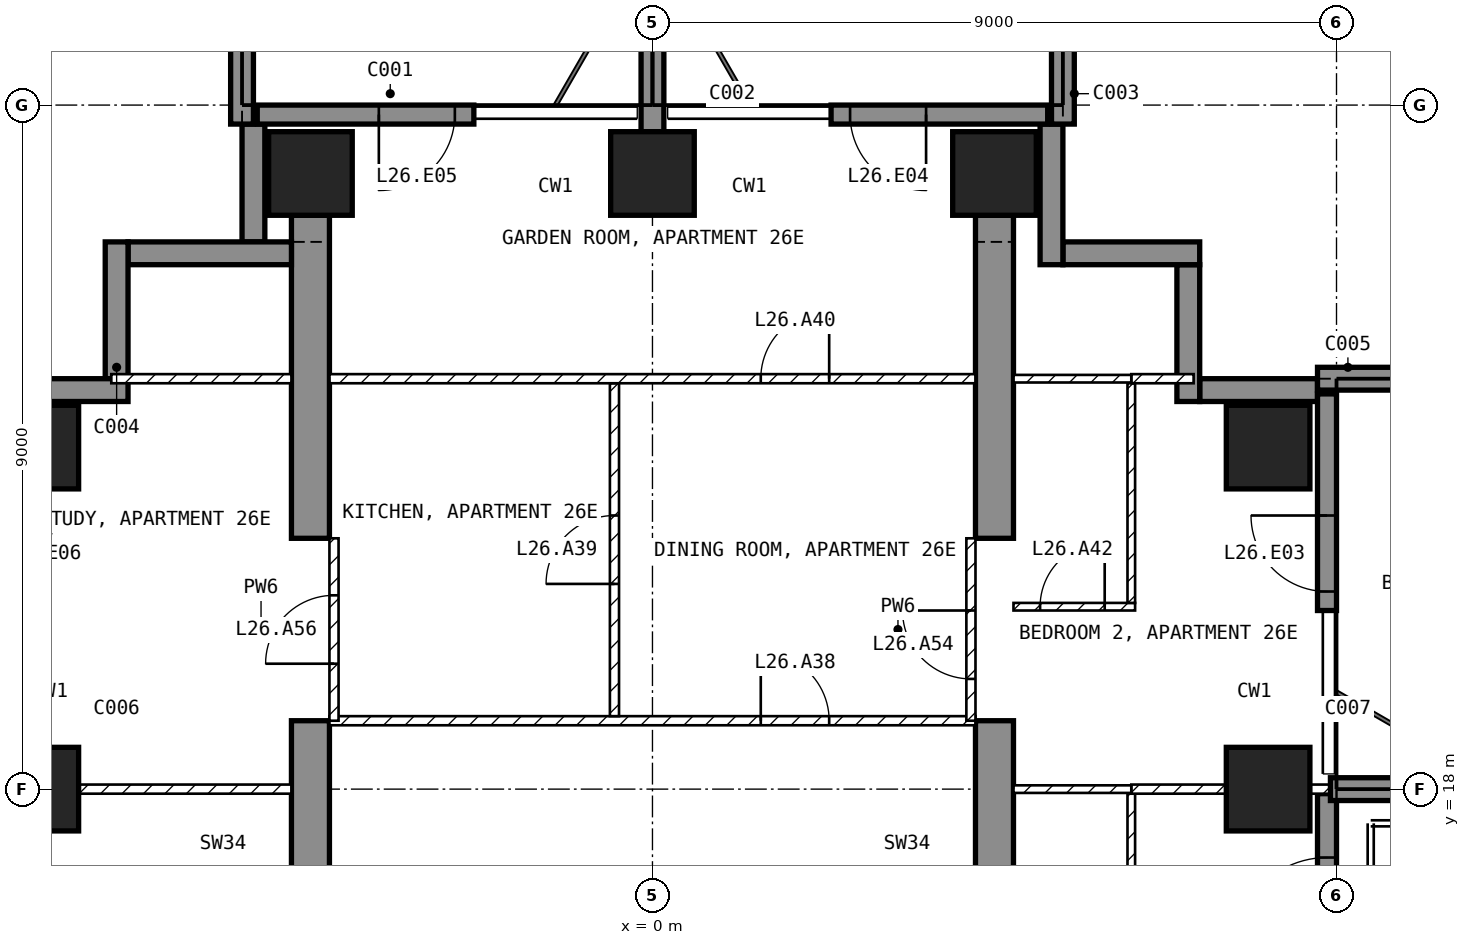
"""IFC4 building model, lengths in metres.
Left out: names, types, materials, properties, quantities, classifications, styles, units other than length and angle.
Written with IfcOpenShell. Run it as: python <this file> out.ifc"""

import sys

from ifc_helpers import new_model, si_unit, direction, frame, frame_2d, origin, origin_2d, place, context, subcontext, project, spatial, polyline, rectangle, outline, extrude, element, fill, save


model = new_model("IFC4")
c1 = context("Model", 3, precision=1e-05, world=origin(), true_north=direction((0.0, 1.0)))
c2 = subcontext(c1, "Body", "Model", "MODEL_VIEW")
j1 = project(units=[si_unit("LENGTHUNIT", "METRE"), si_unit("PLANEANGLEUNIT", "RADIAN")], contexts=[c1])
p1 = place(None, origin())
s1 = spatial("IfcSite", under=j1, at=p1, CompositionType="ELEMENT")
p2 = place(p1, origin())
s2 = spatial("IfcBuilding", under=s1, at=p2, CompositionType="ELEMENT")
p3 = place(p2, frame((0.0, 0.0, 112.9)))
s3 = spatial("IfcBuildingStorey", under=s2, at=p3, CompositionType="ELEMENT", Elevation=112.9)
for number, where, z_axis, x_axis in (
    (1, (-8.1, 18.0, -0.25), (0.0, 0.0, 1.0), (1.0, 0.0, 0.0)),
    (2, (-8.1, 22.5, -0.25), (0.0, 0.0, 1.0), (1.0, 0.0, 0.0)),
    (3, (-4.5, 26.1, -0.25), (0.0, 0.0, 1.0), (1.0, 0.0, 0.0)),
    (4, (0.0, 26.1, -0.25), (0.0, 0.0, 1.0), (1.0, 0.0, 0.0)),
    (5, (4.5, 26.1, -0.25), (0.0, 0.0, 1.0), (1.0, 0.0, 0.0)),
    (6, (8.1, 18.0, -0.25), (0.0, 0.0, 1.0), (1.0, 0.0, 0.0)),
    (7, (8.1, 22.5, -0.25), (0.0, 0.0, 1.0), (1.0, 0.0, 0.0)),
):
    element("IfcColumn", number, at=place(p3, frame(where, z_axis=z_axis, x_axis=x_axis)), inside=s3, PredefinedType="COLUMN", context=c2, shape_type="SweptSolid", body=[
        extrude(rectangle(XDim=1.1, YDim=1.1, at=origin_2d()), origin(), (0.0, 0.0, 1.0), 3.5),
    ])
for number, where, z_axis, x_axis in (
    (8, (-4.75, 9.0, -0.25), (1.0, 0.0, 0.0), (0.0, 1.0, 0.0)),
    (9, (4.25, 9.0, -0.25), (1.0, 0.0, 0.0), (0.0, 1.0, 0.0)),
):
    element("IfcWall", number, at=place(p3, frame(where, z_axis=z_axis, x_axis=x_axis)), inside=s3, PredefinedType="SHEAR", context=c2, shape_type="SweptSolid", body=[
        extrude(outline(polyline([(0.0, 0.0), (2.1, 0.0), (2.1, 2.65), (4.5, 2.65), (4.5, 0.0), (9.9, 0.0), (9.9, 2.65), (12.3, 2.65), (12.3, 0.0), (16.55, 0.0), (16.55, 3.5), (0.0, 3.5), (0.0, 0.0)])), origin(), (0.0, 0.0, 1.0), 0.5),
    ])
p4 = place(p3, frame((8.875, 15.65, 0.0), z_axis=(0.0, 0.0, 1.0), x_axis=(0.0, 1.0, 0.0)))
e10 = element("IfcWall", 10, at=p4, inside=s3, PredefinedType="SOLIDWALL", context=c2, shape_type="SweptSolid", body=[
    extrude(rectangle(XDim=2.29, YDim=0.25, at=frame_2d((1.145, 0.0))), origin(), (0.0, 0.0, 1.0), 3.25),
])
p5 = place(p4, frame((0.25, 0.0, 0.0)))
e11 = element("IfcOpeningElement", 11, at=p5, cuts=e10, PredefinedType="OPENING", context=c2, shape_type="SweptSolid", body=[
    extrude(rectangle(XDim=1.2, YDim=2.4, at=frame_2d((0.6, 1.2))), frame((0.0, 0.135, 0.0), z_axis=(0.0, -1.0, 0.0), x_axis=(1.0, 0.0, 0.0)), (0.0, 0.0, 1.0), 0.27),
])
p6 = place(p3, frame((8.875, 20.35, 0.0), z_axis=(0.0, 0.0, 1.0), x_axis=(0.0, 1.0, 0.0)))
e12 = element("IfcWall", 12, at=p6, inside=s3, PredefinedType="SOLIDWALL", context=c2, shape_type="SweptSolid", body=[
    extrude(rectangle(XDim=2.85, YDim=0.25, at=frame_2d((1.425, 0.0))), origin(), (0.0, 0.0, 1.0), 3.25),
])
p7 = place(p6, frame((0.25, 0.0, 0.0)))
e13 = element("IfcOpeningElement", 13, at=p7, cuts=e12, PredefinedType="OPENING", context=c2, shape_type="SweptSolid", body=[
    extrude(rectangle(XDim=1.0, YDim=2.4, at=frame_2d((0.5, 1.2))), frame((0.0, 0.135, 0.0), z_axis=(0.0, -1.0, 0.0), x_axis=(1.0, 0.0, 0.0)), (0.0, 0.0, 1.0), 0.27),
])
p8 = place(p3, frame((5.2, 26.875, 0.0), z_axis=(0.0, 0.0, 1.0), x_axis=(-1.0, 0.0, 0.0)))
e14 = element("IfcWall", 14, at=p8, inside=s3, PredefinedType="SOLIDWALL", context=c2, shape_type="SweptSolid", body=[
    extrude(rectangle(XDim=2.85, YDim=0.25, at=frame_2d((1.425, 0.0))), origin(), (0.0, 0.0, 1.0), 3.25),
])
p9 = place(p8, frame((1.6, 0.0, 0.0)))
e15 = element("IfcOpeningElement", 15, at=p9, cuts=e14, PredefinedType="OPENING", context=c2, shape_type="SweptSolid", body=[
    extrude(rectangle(XDim=1.0, YDim=2.4, at=frame_2d((0.5, 1.2))), frame((0.0, 0.135, 0.0), z_axis=(0.0, -1.0, 0.0), x_axis=(1.0, 0.0, 0.0)), (0.0, 0.0, 1.0), 0.27),
])
p10 = place(p3, frame((-2.35, 26.875, 0.0), z_axis=(0.0, 0.0, 1.0), x_axis=(-1.0, 0.0, 0.0)))
e16 = element("IfcWall", 16, at=p10, inside=s3, PredefinedType="SOLIDWALL", context=c2, shape_type="SweptSolid", body=[
    extrude(rectangle(XDim=2.85, YDim=0.25, at=frame_2d((1.425, 0.0))), origin(), (0.0, 0.0, 1.0), 3.25),
])
p11 = place(p10, frame((0.25, 0.0, 0.0)))
e17 = element("IfcOpeningElement", 17, at=p11, cuts=e16, PredefinedType="OPENING", context=c2, shape_type="SweptSolid", body=[
    extrude(rectangle(XDim=1.0, YDim=2.4, at=frame_2d((0.5, 1.2))), frame((0.0, 0.135, 0.0), z_axis=(0.0, -1.0, 0.0), x_axis=(1.0, 0.0, 0.0)), (0.0, 0.0, 1.0), 0.27),
])
p12 = place(p3, frame((8.75, 23.25, 0.0), z_axis=(0.0, 0.0, 1.0), x_axis=(-1.0, 0.0, 0.0)))
e18 = element("IfcWall", 18, at=p12, inside=s3, PredefinedType="SOLIDWALL", context=c2, shape_type="SweptSolid", body=[
    extrude(rectangle(XDim=1.55, YDim=0.3, at=frame_2d((0.775, 0.0))), origin(), (0.0, 0.0, 1.0), 3.25),
])
p13 = place(p3, frame((7.05, 23.1, 0.0), z_axis=(0.0, 0.0, 1.0), x_axis=(0.0, 1.0, 0.0)))
e19 = element("IfcWall", 19, at=p13, inside=s3, PredefinedType="SOLIDWALL", context=c2, shape_type="SweptSolid", body=[
    extrude(rectangle(XDim=1.8, YDim=0.3, at=frame_2d((0.9, 0.0))), origin(), (0.0, 0.0, 1.0), 3.25),
])
p14 = place(p3, frame((7.2, 25.05, 0.0), z_axis=(0.0, 0.0, 1.0), x_axis=(-1.0, 0.0, 0.0)))
e20 = element("IfcWall", 20, at=p14, inside=s3, PredefinedType="SOLIDWALL", context=c2, shape_type="SweptSolid", body=[
    extrude(rectangle(XDim=1.8, YDim=0.3, at=frame_2d((0.9, 0.0))), origin(), (0.0, 0.0, 1.0), 3.25),
])
p15 = place(p3, frame((5.25, 24.9, 0.0), z_axis=(0.0, 0.0, 1.0), x_axis=(0.0, 1.0, 0.0)))
e21 = element("IfcWall", 21, at=p15, inside=s3, PredefinedType="SOLIDWALL", context=c2, shape_type="SweptSolid", body=[
    extrude(rectangle(XDim=1.85, YDim=0.3, at=frame_2d((0.925, 0.0))), origin(), (0.0, 0.0, 1.0), 3.25),
])
p16 = place(p3, frame((-5.25, 26.75, 0.0), z_axis=(0.0, 0.0, 1.0), x_axis=(0.0, -1.0, 0.0)))
e22 = element("IfcWall", 22, at=p16, inside=s3, PredefinedType="SOLIDWALL", context=c2, shape_type="SweptSolid", body=[
    extrude(rectangle(XDim=1.55, YDim=0.3, at=frame_2d((0.775, 0.0))), origin(), (0.0, 0.0, 1.0), 3.25),
])
p17 = place(p3, frame((-4.75, 25.05, 0.0), z_axis=(0.0, 0.0, 1.0), x_axis=(-1.0, 0.0, 0.0)))
e23 = element("IfcWall", 23, at=p17, inside=s3, PredefinedType="SOLIDWALL", context=c2, shape_type="SweptSolid", body=[
    extrude(rectangle(XDim=2.15, YDim=0.3, at=frame_2d((1.075, 0.0))), origin(), (0.0, 0.0, 1.0), 3.25),
])
p18 = place(p3, frame((-7.05, 25.2, 0.0), z_axis=(0.0, 0.0, 1.0), x_axis=(0.0, -1.0, 0.0)))
e24 = element("IfcWall", 24, at=p18, inside=s3, PredefinedType="SOLIDWALL", context=c2, shape_type="SweptSolid", body=[
    extrude(rectangle(XDim=1.8, YDim=0.3, at=frame_2d((0.9, 0.0))), origin(), (0.0, 0.0, 1.0), 3.25),
])
p19 = place(p3, frame((-6.9, 23.25, 0.0), z_axis=(0.0, 0.0, 1.0), x_axis=(-1.0, 0.0, 0.0)))
e25 = element("IfcWall", 25, at=p19, inside=s3, PredefinedType="SOLIDWALL", context=c2, shape_type="SweptSolid", body=[
    extrude(rectangle(XDim=1.85, YDim=0.3, at=frame_2d((0.925, 0.0))), origin(), (0.0, 0.0, 1.0), 3.25),
])
p20 = place(p3, frame((-5.4, 26.75, 0.0), z_axis=(0.0, 0.0, 1.0), x_axis=(0.0, 1.0, 0.0)))
e26 = element("IfcWall", 26, at=p20, inside=s3, PredefinedType="SOLIDWALL", context=c2, shape_type="SweptSolid", body=[
    extrude(rectangle(XDim=2.95, YDim=0.3, at=frame_2d((1.475, 0.0))), origin(), (0.0, 0.0, 1.0), 3.25),
])
p21 = place(p3, frame((0.0, 26.65, 0.0), z_axis=(0.0, 0.0, 1.0), x_axis=(0.0, 1.0, 0.0)))
e27 = element("IfcWall", 27, at=p21, inside=s3, PredefinedType="SOLIDWALL", context=c2, shape_type="SweptSolid", body=[
    extrude(rectangle(XDim=3.05, YDim=0.3, at=frame_2d((1.525, 0.0))), origin(), (0.0, 0.0, 1.0), 3.25),
])
p22 = place(p3, frame((5.4, 26.75, 0.0), z_axis=(0.0, 0.0, 1.0), x_axis=(0.0, 1.0, 0.0)))
e28 = element("IfcWall", 28, at=p22, inside=s3, PredefinedType="SOLIDWALL", context=c2, shape_type="SweptSolid", body=[
    extrude(rectangle(XDim=2.95, YDim=0.3, at=frame_2d((1.475, 0.0))), origin(), (0.0, 0.0, 1.0), 3.25),
])
p23 = place(p3, frame((8.92, 18.0, 0.0), z_axis=(0.0, 0.0, 1.0), x_axis=(1.0, 0.0, 0.0)))
e29 = element("IfcWall", 29, at=p23, inside=s3, PredefinedType="SOLIDWALL", context=c2, shape_type="SweptSolid", body=[
    extrude(rectangle(XDim=2.82, YDim=0.3, at=frame_2d((1.41, 0.0))), origin(), (0.0, 0.0, 1.0), 3.25),
])
p24 = place(p3, frame((8.75, 23.4, 0.0), z_axis=(0.0, 0.0, 1.0), x_axis=(1.0, 0.0, 0.0)))
e30 = element("IfcWall", 30, at=p24, inside=s3, PredefinedType="SOLIDWALL", context=c2, shape_type="SweptSolid", body=[
    extrude(rectangle(XDim=2.95, YDim=0.3, at=frame_2d((1.475, 0.0))), origin(), (0.0, 0.0, 1.0), 3.25),
])
p25 = place(p3, frame((-4.25, 18.9, 0.0), z_axis=(0.0, 0.0, 1.0), x_axis=(1.0, 0.0, 0.0)))
e31 = element("IfcWall", 31, at=p25, inside=s3, PredefinedType="PARTITIONING", context=c2, shape_type="SweptSolid", body=[
    extrude(rectangle(XDim=8.5, YDim=0.12, at=frame_2d((4.25, 0.0))), origin(), (0.0, 0.0, 1.0), 3.25),
])
p26 = place(p25, frame((5.675, 0.0, 0.0)))
e32 = element("IfcOpeningElement", 32, at=p26, cuts=e31, PredefinedType="OPENING", context=c2, shape_type="SweptSolid", body=[
    extrude(rectangle(XDim=0.9, YDim=2.1, at=frame_2d((0.45, 1.05))), frame((0.0, 0.07, 0.0), z_axis=(0.0, -1.0, 0.0), x_axis=(1.0, 0.0, 0.0)), (0.0, 0.0, 1.0), 0.14),
])
p27 = place(p3, frame((-0.5, 18.96, 0.0), z_axis=(0.0, 0.0, 1.0), x_axis=(0.0, 1.0, 0.0)))
e33 = element("IfcWall", 33, at=p27, inside=s3, PredefinedType="PARTITIONING", context=c2, shape_type="SweptSolid", body=[
    extrude(rectangle(XDim=4.38, YDim=0.12, at=frame_2d((2.19, 0.0))), origin(), (0.0, 0.0, 1.0), 3.25),
])
p28 = place(p27, frame((1.74, 0.0, 0.0)))
e34 = element("IfcOpeningElement", 34, at=p28, cuts=e33, PredefinedType="OPENING", context=c2, shape_type="SweptSolid", body=[
    extrude(rectangle(XDim=0.9, YDim=2.1, at=frame_2d((0.45, 1.05))), frame((0.0, 0.07, 0.0), z_axis=(0.0, -1.0, 0.0), x_axis=(1.0, 0.0, 0.0)), (0.0, 0.0, 1.0), 0.14),
])
p29 = place(p3, frame((-4.25, 23.4, 0.0), z_axis=(0.0, 0.0, 1.0), x_axis=(1.0, 0.0, 0.0)))
e35 = element("IfcWall", 35, at=p29, inside=s3, PredefinedType="PARTITIONING", context=c2, shape_type="SweptSolid", body=[
    extrude(rectangle(XDim=8.5, YDim=0.12, at=frame_2d((4.25, 0.0))), origin(), (0.0, 0.0, 1.0), 3.25),
])
p30 = place(p29, frame((5.675, 0.0, 0.0)))
e36 = element("IfcOpeningElement", 36, at=p30, cuts=e35, PredefinedType="OPENING", context=c2, shape_type="SweptSolid", body=[
    extrude(rectangle(XDim=0.9, YDim=2.1, at=frame_2d((0.45, 1.05))), frame((0.0, 0.07, 0.0), z_axis=(0.0, -1.0, 0.0), x_axis=(1.0, 0.0, 0.0)), (0.0, 0.0, 1.0), 0.14),
])
p31 = place(p3, frame((6.3, 14.45, 0.0), z_axis=(0.0, 0.0, 1.0), x_axis=(0.0, 1.0, 0.0)))
e37 = element("IfcWall", 37, at=p31, inside=s3, PredefinedType="PARTITIONING", context=c2, shape_type="SweptSolid", body=[
    extrude(rectangle(XDim=3.49, YDim=0.1, at=frame_2d((1.745, 0.0))), origin(), (0.0, 0.0, 1.0), 3.25),
])
p32 = place(p3, frame((6.3, 18.0, 0.0), z_axis=(0.0, 0.0, 1.0), x_axis=(1.0, 0.0, 0.0)))
e38 = element("IfcWall", 38, at=p32, inside=s3, PredefinedType="PARTITIONING", context=c2, shape_type="SweptSolid", body=[
    extrude(rectangle(XDim=2.62, YDim=0.12, at=frame_2d((1.31, 0.0))), origin(), (0.0, 0.0, 1.0), 2.414),
])
p33 = place(p3, frame((4.75, 18.0, 0.0), z_axis=(0.0, 0.0, 1.0), x_axis=(1.0, 0.0, 0.0)))
e39 = element("IfcWall", 39, at=p33, inside=s3, PredefinedType="PARTITIONING", context=c2, shape_type="SweptSolid", body=[
    extrude(rectangle(XDim=1.55, YDim=0.1, at=frame_2d((0.775, 0.0))), origin(), (0.0, 0.0, 1.0), 2.414),
])
p34 = place(p3, frame((4.75, 20.4, 0.0), z_axis=(0.0, 0.0, 1.0), x_axis=(1.0, 0.0, 0.0)))
e40 = element("IfcWall", 40, at=p34, inside=s3, PredefinedType="PARTITIONING", context=c2, shape_type="SweptSolid", body=[
    extrude(rectangle(XDim=1.6, YDim=0.1, at=frame_2d((0.8, 0.0))), origin(), (0.0, 0.0, 1.0), 3.25),
])
p35 = place(p34, frame((0.35, 0.0, 0.0)))
e41 = element("IfcOpeningElement", 41, at=p35, cuts=e40, PredefinedType="OPENING", context=c2, shape_type="SweptSolid", body=[
    extrude(rectangle(XDim=0.85, YDim=2.1, at=frame_2d((0.425, 1.05))), frame((0.0, 0.06, 0.0), z_axis=(0.0, -1.0, 0.0), x_axis=(1.0, 0.0, 0.0)), (0.0, 0.0, 1.0), 0.12),
])
p36 = place(p3, frame((6.3, 20.45, 0.0), z_axis=(0.0, 0.0, 1.0), x_axis=(0.0, 1.0, 0.0)))
e42 = element("IfcWall", 42, at=p36, inside=s3, PredefinedType="PARTITIONING", context=c2, shape_type="SweptSolid", body=[
    extrude(rectangle(XDim=2.89, YDim=0.1, at=frame_2d((1.445, 0.0))), origin(), (0.0, 0.0, 1.0), 3.25),
])
p37 = place(p3, frame((6.3, 23.4, 0.0), z_axis=(0.0, 0.0, 1.0), x_axis=(1.0, 0.0, 0.0)))
e43 = element("IfcWall", 43, at=p37, inside=s3, PredefinedType="PARTITIONING", context=c2, shape_type="SweptSolid", body=[
    extrude(rectangle(XDim=0.82, YDim=0.12, at=frame_2d((0.41, 0.0))), origin(), (0.0, 0.0, 1.0), 3.25),
])
p38 = place(p3, frame((4.75, 23.4, 0.0), z_axis=(0.0, 0.0, 1.0), x_axis=(1.0, 0.0, 0.0)))
e44 = element("IfcWall", 44, at=p38, inside=s3, PredefinedType="PARTITIONING", context=c2, shape_type="SweptSolid", body=[
    extrude(rectangle(XDim=1.55, YDim=0.1, at=frame_2d((0.775, 0.0))), origin(), (0.0, 0.0, 1.0), 3.25),
])
p39 = place(p3, frame((-8.92, 18.0, 0.0), z_axis=(0.0, 0.0, 1.0), x_axis=(1.0, 0.0, 0.0)))
e45 = element("IfcWall", 45, at=p39, inside=s3, PredefinedType="PARTITIONING", context=c2, shape_type="SweptSolid", body=[
    extrude(rectangle(XDim=4.17, YDim=0.12, at=frame_2d((2.085, 0.0))), origin(), (0.0, 0.0, 1.0), 2.414),
])
p40 = place(p3, frame((-7.12, 23.4, 0.0), z_axis=(0.0, 0.0, 1.0), x_axis=(1.0, 0.0, 0.0)))
e46 = element("IfcWall", 46, at=p40, inside=s3, PredefinedType="PARTITIONING", context=c2, shape_type="SweptSolid", body=[
    extrude(rectangle(XDim=2.37, YDim=0.12, at=frame_2d((1.185, 0.0))), origin(), (0.0, 0.0, 1.0), 3.25),
])
p41 = place(p3, frame((4.19, 18.9, 0.0), z_axis=(0.0, 0.0, 1.0), x_axis=(0.0, 1.0, 0.0)))
e47 = element("IfcWall", 47, at=p41, inside=s3, PredefinedType="PARTITIONING", context=c2, shape_type="SweptSolid", body=[
    extrude(rectangle(XDim=2.4, YDim=0.12, at=frame_2d((1.2, 0.0))), origin(), (0.0, 0.0, 1.0), 2.4),
])
p42 = place(p41, frame((0.55, 0.0, 0.0)))
e48 = element("IfcOpeningElement", 48, at=p42, cuts=e47, PredefinedType="OPENING", context=c2, shape_type="SweptSolid", body=[
    extrude(rectangle(XDim=0.9, YDim=2.1, at=frame_2d((0.45, 1.05))), frame((0.0, 0.07, 0.0), z_axis=(0.0, -1.0, 0.0), x_axis=(1.0, 0.0, 0.0)), (0.0, 0.0, 1.0), 0.14),
])
p43 = place(p3, frame((-4.19, 18.9, 0.0), z_axis=(0.0, 0.0, 1.0), x_axis=(0.0, 1.0, 0.0)))
e49 = element("IfcWall", 49, at=p43, inside=s3, PredefinedType="PARTITIONING", context=c2, shape_type="SweptSolid", body=[
    extrude(rectangle(XDim=2.4, YDim=0.12, at=frame_2d((1.2, 0.0))), origin(), (0.0, 0.0, 1.0), 2.4),
])
p44 = place(p43, frame((0.75, 0.0, 0.0)))
e50 = element("IfcOpeningElement", 50, at=p44, cuts=e49, PredefinedType="OPENING", context=c2, shape_type="SweptSolid", body=[
    extrude(rectangle(XDim=0.9, YDim=2.1, at=frame_2d((0.45, 1.05))), frame((0.0, 0.07, 0.0), z_axis=(0.0, -1.0, 0.0), x_axis=(1.0, 0.0, 0.0)), (0.0, 0.0, 1.0), 0.14),
])
p45 = place(p5, origin())
e51 = element("IfcDoor", 51, at=p45, inside=s3, OperationType="SINGLE_SWING_LEFT", PredefinedType="DOOR", context=c2, shape_type="SweptSolid", body=[
    extrude(rectangle(XDim=1.2, YDim=2.4, at=frame_2d((0.6, 1.2))), frame((0.0, 0.025, 0.0), z_axis=(0.0, -1.0, 0.0), x_axis=(1.0, 0.0, 0.0)), (0.0, 0.0, 1.0), 0.05),
])
fill(e11, e51)
p46 = place(p7, origin())
e52 = element("IfcDoor", 52, at=p46, inside=s3, OperationType="SINGLE_SWING_RIGHT", PredefinedType="DOOR", context=c2, shape_type="SweptSolid", body=[
    extrude(rectangle(XDim=1.0, YDim=2.4, at=frame_2d((0.5, 1.2))), frame((0.0, 0.025, 0.0), z_axis=(0.0, -1.0, 0.0), x_axis=(1.0, 0.0, 0.0)), (0.0, 0.0, 1.0), 0.05),
])
fill(e13, e52)
p47 = place(p9, origin())
e53 = element("IfcDoor", 53, at=p47, inside=s3, OperationType="SINGLE_SWING_LEFT", PredefinedType="DOOR", context=c2, shape_type="SweptSolid", body=[
    extrude(rectangle(XDim=1.0, YDim=2.4, at=frame_2d((0.5, 1.2))), frame((0.0, 0.025, 0.0), z_axis=(0.0, -1.0, 0.0), x_axis=(1.0, 0.0, 0.0)), (0.0, 0.0, 1.0), 0.05),
])
fill(e15, e53)
p48 = place(p11, origin())
e54 = element("IfcDoor", 54, at=p48, inside=s3, OperationType="SINGLE_SWING_RIGHT", PredefinedType="DOOR", context=c2, shape_type="SweptSolid", body=[
    extrude(rectangle(XDim=1.0, YDim=2.4, at=frame_2d((0.5, 1.2))), frame((0.0, 0.025, 0.0), z_axis=(0.0, -1.0, 0.0), x_axis=(1.0, 0.0, 0.0)), (0.0, 0.0, 1.0), 0.05),
])
fill(e17, e54)
p49 = place(p26, origin())
e55 = element("IfcDoor", 55, at=p49, inside=s3, OperationType="SINGLE_SWING_LEFT", PredefinedType="DOOR", context=c2, shape_type="SweptSolid", body=[
    extrude(rectangle(XDim=0.9, YDim=2.1, at=frame_2d((0.45, 1.05))), frame((0.0, 0.025, 0.0), z_axis=(0.0, -1.0, 0.0), x_axis=(1.0, 0.0, 0.0)), (0.0, 0.0, 1.0), 0.05),
])
fill(e32, e55)
p50 = place(p28, origin())
e56 = element("IfcDoor", 56, at=p50, inside=s3, OperationType="SINGLE_SWING_LEFT", PredefinedType="DOOR", context=c2, shape_type="SweptSolid", body=[
    extrude(rectangle(XDim=0.9, YDim=2.1, at=frame_2d((0.45, 1.05))), frame((0.0, 0.025, 0.0), z_axis=(0.0, -1.0, 0.0), x_axis=(1.0, 0.0, 0.0)), (0.0, 0.0, 1.0), 0.05),
])
fill(e34, e56)
p51 = place(p30, origin())
e57 = element("IfcDoor", 57, at=p51, inside=s3, OperationType="SINGLE_SWING_RIGHT", PredefinedType="DOOR", context=c2, shape_type="SweptSolid", body=[
    extrude(rectangle(XDim=0.9, YDim=2.1, at=frame_2d((0.45, 1.05))), frame((0.0, 0.025, 0.0), z_axis=(0.0, -1.0, 0.0), x_axis=(1.0, 0.0, 0.0)), (0.0, 0.0, 1.0), 0.05),
])
fill(e36, e57)
p52 = place(p35, origin())
e58 = element("IfcDoor", 58, at=p52, inside=s3, OperationType="SINGLE_SWING_RIGHT", PredefinedType="DOOR", context=c2, shape_type="SweptSolid", body=[
    extrude(rectangle(XDim=0.85, YDim=2.1, at=frame_2d((0.425, 1.05))), frame((0.0, 0.025, 0.0), z_axis=(0.0, -1.0, 0.0), x_axis=(1.0, 0.0, 0.0)), (0.0, 0.0, 1.0), 0.05),
])
fill(e41, e58)
p53 = place(p42, origin())
e59 = element("IfcDoor", 59, at=p53, inside=s3, OperationType="SINGLE_SWING_RIGHT", PredefinedType="DOOR", context=c2, shape_type="SweptSolid", body=[
    extrude(rectangle(XDim=0.9, YDim=2.1, at=frame_2d((0.45, 1.05))), frame((0.0, 0.025, 0.0), z_axis=(0.0, -1.0, 0.0), x_axis=(1.0, 0.0, 0.0)), (0.0, 0.0, 1.0), 0.05),
])
fill(e48, e59)
p54 = place(p44, origin())
e60 = element("IfcDoor", 60, at=p54, inside=s3, OperationType="SINGLE_SWING_LEFT", PredefinedType="DOOR", context=c2, shape_type="SweptSolid", body=[
    extrude(rectangle(XDim=0.9, YDim=2.1, at=frame_2d((0.45, 1.05))), frame((0.0, 0.025, 0.0), z_axis=(0.0, -1.0, 0.0), x_axis=(1.0, 0.0, 0.0)), (0.0, 0.0, 1.0), 0.05),
])
fill(e50, e60)
save(model, sys.argv[1])
